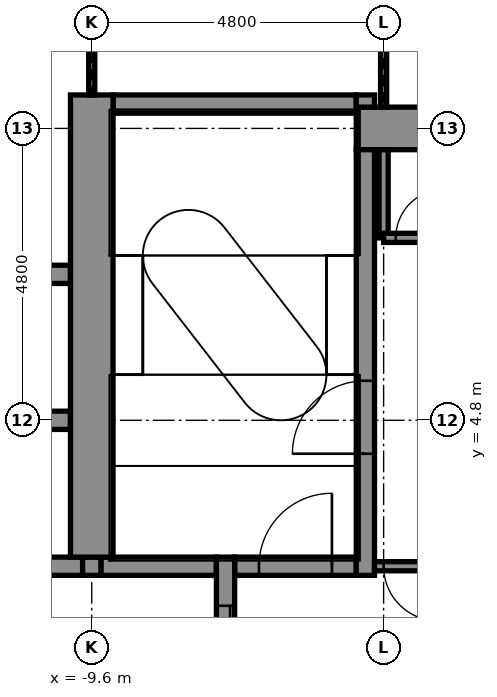
"""IFC4 building model, lengths in metres.
Left out: names, types, materials, properties, quantities, classifications, styles, units other than length and angle.
Written with IfcOpenShell. Run it as: python <this file> out.ifc"""

import sys

from ifc_helpers import new_model, si_unit, direction, frame, frame_2d, origin, place, context, subcontext, project, spatial, rectangle, extrude, element, fill, save


model = new_model("IFC4")
c1 = context("Model", 3, precision=1e-05, world=origin(), true_north=direction((0.0, 1.0)))
c2 = subcontext(c1, "Body", "Model", "MODEL_VIEW")
j1 = project(units=[si_unit("LENGTHUNIT", "METRE"), si_unit("PLANEANGLEUNIT", "RADIAN")], contexts=[c1])
p1 = place(None, origin())
s1 = spatial("IfcSite", under=j1, at=p1, CompositionType="ELEMENT")
p2 = place(p1, origin())
s2 = spatial("IfcBuilding", under=s1, at=p2, CompositionType="ELEMENT")
p3 = place(p2, frame((0.0, 0.0, 133.4)))
s3 = spatial("IfcBuildingStorey", under=s2, at=p3, CompositionType="ELEMENT", Elevation=133.4)
p4 = place(p3, frame((-10.85, 2.4, -0.15), z_axis=(0.0, 0.0, 1.0), x_axis=(1.0, 0.0, 0.0)))
e1 = element("IfcWall", 1, at=p4, inside=s3, PredefinedType="STANDARD", context=c2, shape_type="SweptSolid", body=[
    extrude(rectangle(XDim=1.1, YDim=0.3, at=frame_2d((0.55, 0.0))), origin(), (0.0, 0.0, 1.0), 5.4),
])
p5 = place(p3, frame((-9.45, 2.4, -0.15), z_axis=(0.0, 0.0, 1.0), x_axis=(1.0, 0.0, 0.0)))
e2 = element("IfcWall", 2, at=p5, inside=s3, PredefinedType="STANDARD", context=c2, shape_type="SweptSolid", body=[
    extrude(rectangle(XDim=1.9, YDim=0.3, at=frame_2d((0.95, 0.0))), origin(), (0.0, 0.0, 1.0), 5.4),
])
p6 = place(p3, frame((-7.25, 2.4, -0.15), z_axis=(0.0, 0.0, 1.0), x_axis=(1.0, 0.0, 0.0)))
e3 = element("IfcWall", 3, at=p6, inside=s3, PredefinedType="STANDARD", context=c2, shape_type="SweptSolid", body=[
    extrude(rectangle(XDim=2.0, YDim=0.3, at=frame_2d((1.0, 0.0))), origin(), (0.0, 0.0, 1.0), 5.4),
])
p7 = place(p6, frame((0.4, 0.0, 0.15)))
e4 = element("IfcOpeningElement", 4, at=p7, cuts=e3, PredefinedType="OPENING", context=c2, shape_type="SweptSolid", body=[
    extrude(rectangle(XDim=1.2, YDim=2.1, at=frame_2d((0.6, 1.05))), frame((0.0, 0.16, 0.0), z_axis=(0.0, -1.0, 0.0), x_axis=(1.0, 0.0, 0.0)), (0.0, 0.0, 1.0), 0.32),
])
for number, where, z_axis, x_axis in (
    (5, (-14.25, 4.8, -0.15), (0.0, 0.0, 1.0), (1.0, 0.0, 0.0)),
    (6, (-14.25, 7.2, -0.15), (0.0, 0.0, 1.0), (1.0, 0.0, 0.0)),
):
    element("IfcWall", number, at=place(p3, frame(where, z_axis=z_axis, x_axis=x_axis)), inside=s3, PredefinedType="STANDARD", context=c2, shape_type="SweptSolid", body=[
        extrude(rectangle(XDim=4.3, YDim=0.3, at=frame_2d((2.15, 0.0))), origin(), (0.0, 0.0, 1.0), 4.55),
    ])
p8 = place(p3, frame((-5.25, 9.6, -0.15), z_axis=(0.0, 0.0, 1.0), x_axis=(1.0, 0.0, 0.0)))
e7 = element("IfcWall", 7, at=p8, inside=s3, PredefinedType="SHEAR", context=c2, shape_type="SweptSolid", body=[
    extrude(rectangle(XDim=14.5, YDim=0.7, at=frame_2d((7.25, 0.0))), origin(), (0.0, 0.0, 1.0), 5.4),
])
p9 = place(p8, frame((9.35, 0.0, 0.15)))
e8 = element("IfcOpeningElement", 8, at=p9, cuts=e7, PredefinedType="OPENING", context=c2, shape_type="SweptSolid", body=[
    extrude(rectangle(XDim=1.4, YDim=2.1, at=frame_2d((0.7, 1.05))), frame((0.0, 0.36, 0.0), z_axis=(0.0, -1.0, 0.0), x_axis=(1.0, 0.0, 0.0)), (0.0, 0.0, 1.0), 0.72),
])
p10 = place(p3, frame((-9.25, 10.0, -0.15), z_axis=(0.0, 0.0, 1.0), x_axis=(1.0, 0.0, 0.0)))
e9 = element("IfcWall", 9, at=p10, inside=s3, PredefinedType="STANDARD", context=c2, shape_type="SweptSolid", body=[
    extrude(rectangle(XDim=4.0, YDim=0.3, at=frame_2d((2.0, 0.0))), origin(), (0.0, 0.0, 1.0), 5.4),
])
p11 = place(p3, frame((-9.6, 2.25, -0.15), z_axis=(0.0, 0.0, 1.0), x_axis=(0.0, 1.0, 0.0)))
e10 = element("IfcWall", 10, at=p11, inside=s3, PredefinedType="STANDARD", context=c2, shape_type="SweptSolid", body=[
    extrude(rectangle(XDim=0.3, YDim=0.3, at=frame_2d((0.15, 0.0))), origin(), (0.0, 0.0, 1.0), 5.4),
])
p12 = place(p3, frame((-9.6, 2.55, -0.15), z_axis=(0.0, 0.0, 1.0), x_axis=(0.0, 1.0, 0.0)))
e11 = element("IfcWall", 11, at=p12, inside=s3, PredefinedType="SHEAR", context=c2, shape_type="SweptSolid", body=[
    extrude(rectangle(XDim=7.6, YDim=0.7, at=frame_2d((3.8, 0.0))), origin(), (0.0, 0.0, 1.0), 5.4),
])
p13 = place(p3, frame((-7.4, -2.55, -0.15), z_axis=(0.0, 0.0, 1.0), x_axis=(0.0, 1.0, 0.0)))
e12 = element("IfcWall", 12, at=p13, inside=s3, PredefinedType="STANDARD", context=c2, shape_type="SweptSolid", body=[
    extrude(rectangle(XDim=5.1, YDim=0.3, at=frame_2d((2.55, 0.0))), origin(), (0.0, 0.0, 1.0), 5.4),
])
p14 = place(p13, frame((0.8, 0.0, 0.15)))
e13 = element("IfcOpeningElement", 13, at=p14, cuts=e12, PredefinedType="OPENING", context=c2, shape_type="SweptSolid", body=[
    extrude(rectangle(XDim=1.1, YDim=2.1, at=frame_2d((0.55, 1.05))), frame((0.0, 0.16, 0.0), z_axis=(0.0, -1.0, 0.0), x_axis=(1.0, 0.0, 0.0)), (0.0, 0.0, 1.0), 0.32),
])
p15 = place(p13, frame((3.2, 0.0, 0.15)))
e14 = element("IfcOpeningElement", 14, at=p15, cuts=e12, PredefinedType="OPENING", context=c2, shape_type="SweptSolid", body=[
    extrude(rectangle(XDim=1.1, YDim=2.1, at=frame_2d((0.55, 1.05))), frame((0.0, 0.16, 0.0), z_axis=(0.0, -1.0, 0.0), x_axis=(1.0, 0.0, 0.0)), (0.0, 0.0, 1.0), 0.32),
])
p16 = place(p3, frame((-5.1, 2.25, -0.15), z_axis=(0.0, 0.0, 1.0), x_axis=(0.0, 1.0, 0.0)))
e15 = element("IfcWall", 15, at=p16, inside=s3, PredefinedType="STANDARD", context=c2, shape_type="SweptSolid", body=[
    extrude(rectangle(XDim=7.0, YDim=0.3, at=frame_2d((3.5, 0.0))), origin(), (0.0, 0.0, 1.0), 5.4),
])
p17 = place(p16, frame((2.0, 0.0, 0.15)))
e16 = element("IfcOpeningElement", 16, at=p17, cuts=e15, PredefinedType="OPENING", context=c2, shape_type="SweptSolid", body=[
    extrude(rectangle(XDim=1.2, YDim=2.1, at=frame_2d((0.6, 1.05))), frame((0.0, 0.16, 0.0), z_axis=(0.0, -1.0, 0.0), x_axis=(1.0, 0.0, 0.0)), (0.0, 0.0, 1.0), 0.32),
])
p18 = place(p3, frame((-5.1, 9.95, -0.15), z_axis=(0.0, 0.0, 1.0), x_axis=(0.0, 1.0, 0.0)))
e17 = element("IfcWall", 17, at=p18, inside=s3, PredefinedType="STANDARD", context=c2, shape_type="SweptSolid", body=[
    extrude(rectangle(XDim=0.2, YDim=0.3, at=frame_2d((0.1, 0.0))), origin(), (0.0, 0.0, 1.0), 5.4),
])
p19 = place(p3, frame((-4.8, 9.95, 0.0), z_axis=(0.0, 0.0, 1.0), x_axis=(0.0, 1.0, 0.0)))
e18 = element("IfcWall", 18, at=p19, inside=s3, PredefinedType="PARTITIONING", context=c2, shape_type="SweptSolid", body=[
    extrude(rectangle(XDim=4.85, YDim=0.1, at=frame_2d((2.425, 0.0))), origin(), (0.0, 0.0, 1.0), 4.566),
])
p20 = place(p3, frame((-4.8, 7.8, 0.0), z_axis=(0.0, 0.0, 1.0), x_axis=(0.0, 1.0, 0.0)))
e19 = element("IfcWall", 19, at=p20, inside=s3, PredefinedType="PARTITIONING", context=c2, shape_type="SweptSolid", body=[
    extrude(rectangle(XDim=1.45, YDim=0.15, at=frame_2d((0.725, 0.0))), origin(), (0.0, 0.0, 1.0), 5.25),
])
p21 = place(p3, frame((-9.6, 10.15, 0.0), z_axis=(0.0, 0.0, 1.0), x_axis=(0.0, 1.0, 0.0)))
e20 = element("IfcWall", 20, at=p21, inside=s3, PredefinedType="PARTITIONING", context=c2, shape_type="SweptSolid", body=[
    extrude(rectangle(XDim=4.65, YDim=0.1, at=frame_2d((2.325, 0.0))), origin(), (0.0, 0.0, 1.0), 4.566),
])
p22 = place(p3, frame((-4.8, 7.8, 0.0), z_axis=(0.0, 0.0, 1.0), x_axis=(1.0, 0.0, 0.0)))
e21 = element("IfcWall", 21, at=p22, inside=s3, PredefinedType="PARTITIONING", context=c2, shape_type="SweptSolid", body=[
    extrude(rectangle(XDim=1.05, YDim=0.15, at=frame_2d((0.525, 0.0))), origin(), (0.0, 0.0, 1.0), 5.25),
])
p23 = place(p22, frame((0.2, 0.0, 0.0)))
e22 = element("IfcOpeningElement", 22, at=p23, cuts=e21, PredefinedType="OPENING", context=c2, shape_type="SweptSolid", body=[
    extrude(rectangle(XDim=0.8, YDim=2.1, at=frame_2d((0.4, 1.05))), frame((0.0, 0.085, 0.0), z_axis=(0.0, -1.0, 0.0), x_axis=(1.0, 0.0, 0.0)), (0.0, 0.0, 1.0), 0.17),
])
p24 = place(p3, frame((-4.95, 2.4, 0.0), z_axis=(0.0, 0.0, 1.0), x_axis=(1.0, 0.0, 0.0)))
e23 = element("IfcWall", 23, at=p24, inside=s3, PredefinedType="PARTITIONING", context=c2, shape_type="SweptSolid", body=[
    extrude(rectangle(XDim=1.2, YDim=0.15, at=frame_2d((0.6, 0.0))), origin(), (0.0, 0.0, 1.0), 5.25),
])
p25 = place(p24, frame((0.15, 0.0, 0.0)))
e24 = element("IfcOpeningElement", 24, at=p25, cuts=e23, PredefinedType="OPENING", context=c2, shape_type="SweptSolid", body=[
    extrude(rectangle(XDim=0.9, YDim=2.1, at=frame_2d((0.45, 1.05))), frame((0.0, 0.085, 0.0), z_axis=(0.0, -1.0, 0.0), x_axis=(1.0, 0.0, 0.0)), (0.0, 0.0, 1.0), 0.17),
])
p26 = place(p23, origin())
e25 = element("IfcDoor", 25, at=p26, inside=s3, OperationType="SINGLE_SWING_RIGHT", PredefinedType="DOOR", context=c2, shape_type="SweptSolid", body=[
    extrude(rectangle(XDim=0.8, YDim=2.1, at=frame_2d((0.4, 1.05))), frame((0.0, 0.025, 0.0), z_axis=(0.0, -1.0, 0.0), x_axis=(1.0, 0.0, 0.0)), (0.0, 0.0, 1.0), 0.05),
])
fill(e22, e25)
p27 = place(p15, origin())
e26 = element("IfcDoor", 26, at=p27, inside=s3, OperationType="DOUBLE_DOOR_SLIDING", PredefinedType="DOOR", context=c2, shape_type="SweptSolid", body=[
    extrude(rectangle(XDim=1.1, YDim=2.1, at=frame_2d((0.55, 1.05))), frame((0.0, 0.025, 0.0), z_axis=(0.0, -1.0, 0.0), x_axis=(1.0, 0.0, 0.0)), (0.0, 0.0, 1.0), 0.05),
])
fill(e14, e26)
p28 = place(p17, origin())
e27 = element("IfcDoor", 27, at=p28, inside=s3, OperationType="SINGLE_SWING_LEFT", PredefinedType="DOOR", context=c2, shape_type="SweptSolid", body=[
    extrude(rectangle(XDim=1.2, YDim=2.1, at=frame_2d((0.6, 1.05))), frame((0.0, 0.025, 0.0), z_axis=(0.0, -1.0, 0.0), x_axis=(1.0, 0.0, 0.0)), (0.0, 0.0, 1.0), 0.05),
])
fill(e16, e27)
p29 = place(p25, frame((0.9, 0.0, 0.0), z_axis=(0.0, 0.0, 1.0), x_axis=(-1.0, 0.0, 0.0)))
e28 = element("IfcDoor", 28, at=p29, inside=s3, OperationType="SINGLE_SWING_RIGHT", PredefinedType="DOOR", context=c2, shape_type="SweptSolid", body=[
    extrude(rectangle(XDim=0.9, YDim=2.1, at=frame_2d((0.45, 1.05))), frame((0.0, 0.025, 0.0), z_axis=(0.0, -1.0, 0.0), x_axis=(1.0, 0.0, 0.0)), (0.0, 0.0, 1.0), 0.05),
])
fill(e24, e28)
p30 = place(p7, origin())
e29 = element("IfcDoor", 29, at=p30, inside=s3, OperationType="SINGLE_SWING_RIGHT", PredefinedType="DOOR", context=c2, shape_type="SweptSolid", body=[
    extrude(rectangle(XDim=1.2, YDim=2.1, at=frame_2d((0.6, 1.05))), frame((0.0, 0.025, 0.0), z_axis=(0.0, -1.0, 0.0), x_axis=(1.0, 0.0, 0.0)), (0.0, 0.0, 1.0), 0.05),
])
fill(e4, e29)
save(model, sys.argv[1])
